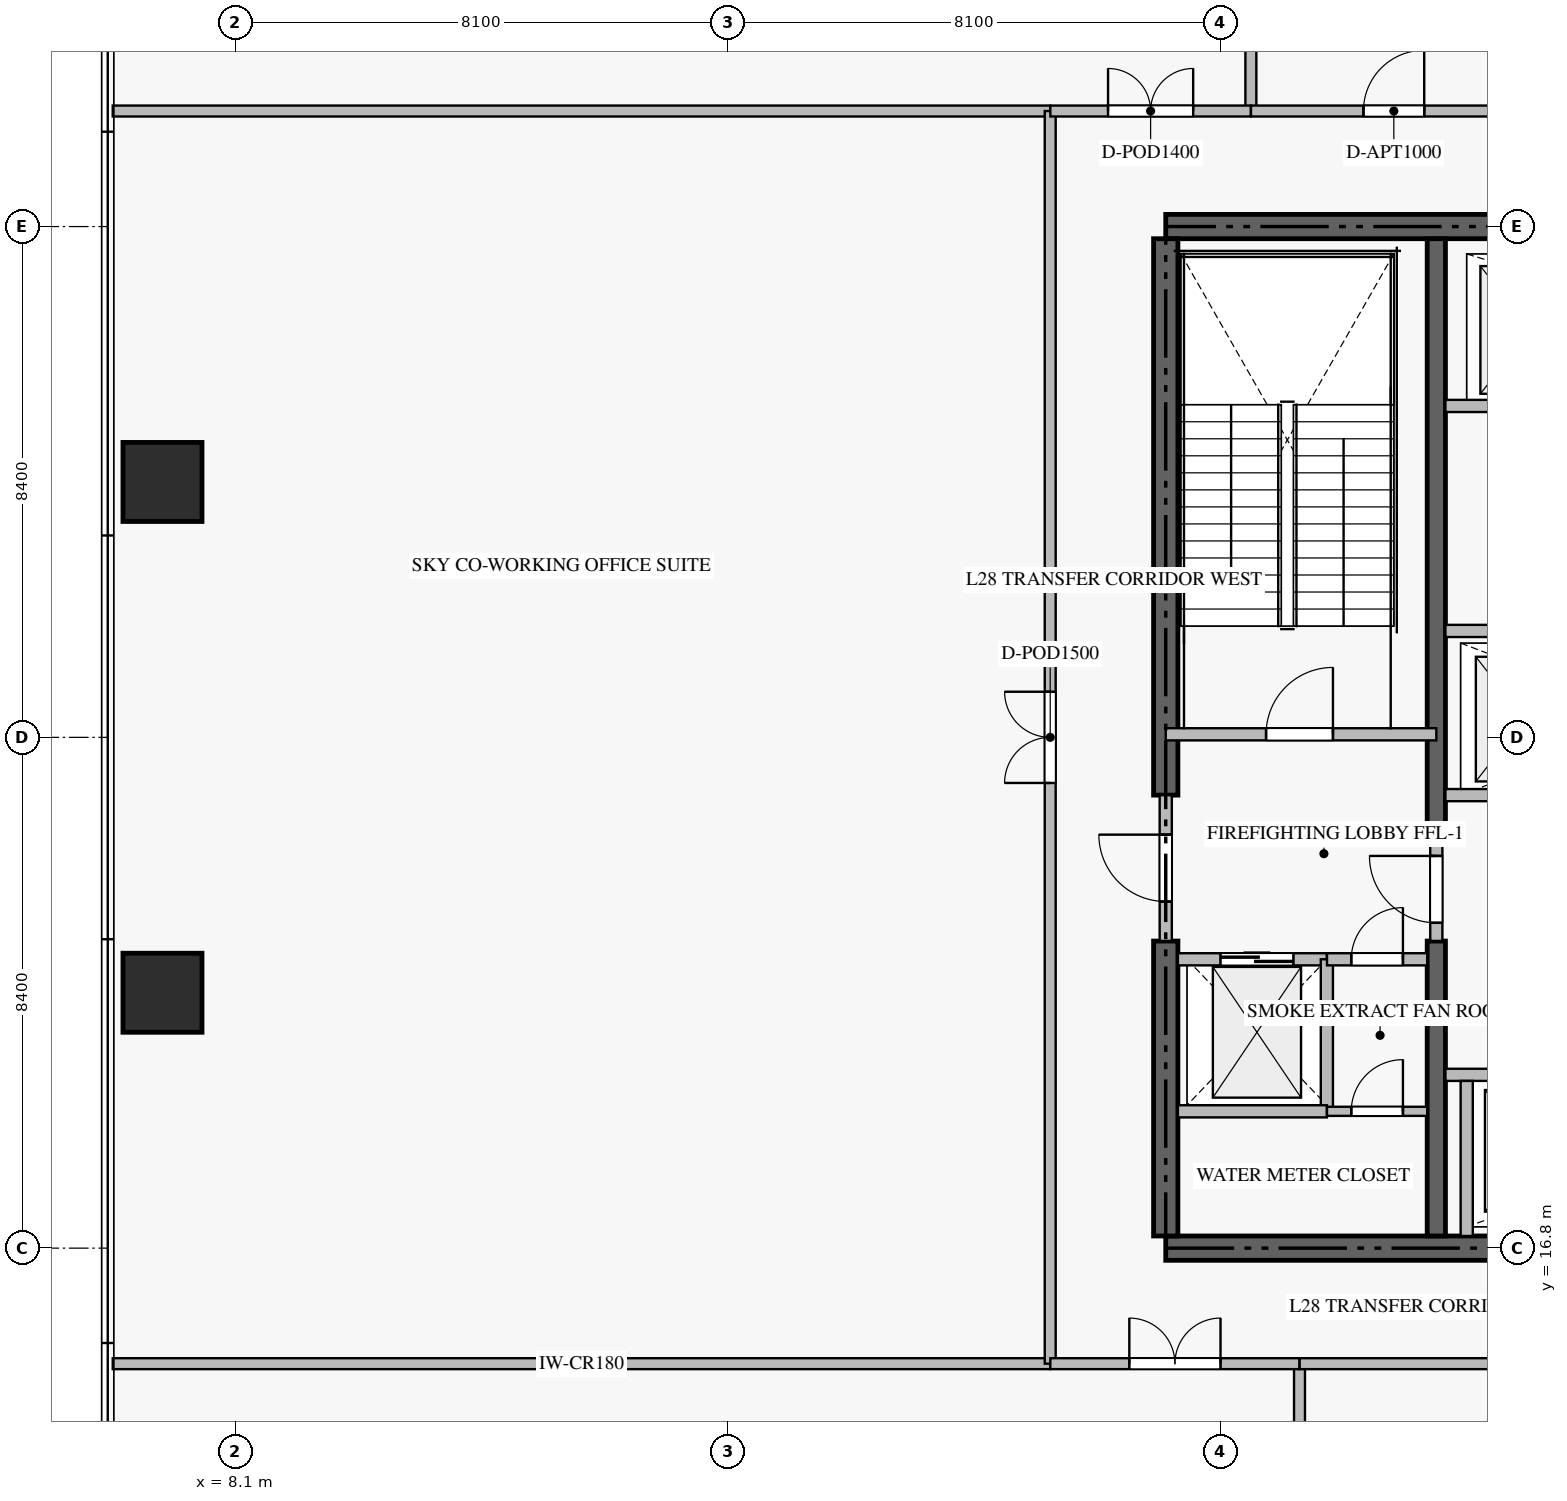
"""IFC4 building model, lengths in metres.
Left out: names, types, materials, properties, quantities, classifications, styles, units other than length and angle.
Written with IfcOpenShell. Run it as: python <this file> out.ifc"""

import sys

from ifc_helpers import new_model, si_unit, direction, frame, frame_2d, origin, origin_2d, place, context, subcontext, project, spatial, rectangle, extrude, source, transform, mapped, element, fill, save


model = new_model("IFC4")
c1 = context("Model", 3, precision=1e-05, world=origin(), true_north=direction((0.0, 1.0)))
c2 = subcontext(c1, "Body", "Model", "MODEL_VIEW")
j1 = project(units=[si_unit("LENGTHUNIT", "METRE"), si_unit("PLANEANGLEUNIT", "RADIAN")], contexts=[c1])
p1 = place(None, origin())
s1 = spatial("IfcSite", under=j1, at=p1, CompositionType="ELEMENT")
p2 = place(p1, origin())
s2 = spatial("IfcBuilding", under=s1, at=p2, CompositionType="ELEMENT")
p3 = place(p2, frame((0.0, 0.0, 115.2)))
s3 = spatial("IfcBuildingStorey", under=s2, at=p3, CompositionType="ELEMENT", Elevation=115.2)
for number, where, z_axis, x_axis in (
    (1, (23.4, 16.8, -0.36), (0.0, 0.0, 1.0), (1.0, 0.0, 0.0)),
    (2, (41.4, 33.6, -0.36), (0.0, 0.0, 1.0), (-1.0, 0.0, 0.0)),
):
    element("IfcWall", number, at=place(p3, frame(where, z_axis=z_axis, x_axis=x_axis)), inside=s3, PredefinedType="SHEAR", context=c2, shape_type="SweptSolid", body=[
        extrude(rectangle(XDim=18.0, YDim=0.4, at=frame_2d((9.0, 0.0))), origin(), (0.0, 0.0, 1.0), 4.868),
    ])
p4 = place(p3, frame((23.4, 17.0, -0.36), z_axis=(0.0, 0.0, 1.0), x_axis=(0.0, 1.0, 0.0)))
e3 = element("IfcWall", 3, at=p4, inside=s3, PredefinedType="SHEAR", context=c2, shape_type="SweptSolid", body=[
    extrude(rectangle(XDim=4.85, YDim=0.4, at=frame_2d((2.425, 0.0))), origin(), (0.0, 0.0, 1.0), 4.868),
])
p5 = place(p3, frame((23.4, 24.25, -0.36), z_axis=(0.0, 0.0, 1.0), x_axis=(0.0, 1.0, 0.0)))
e4 = element("IfcWall", 4, at=p5, inside=s3, PredefinedType="SHEAR", context=c2, shape_type="SweptSolid", body=[
    extrude(rectangle(XDim=9.15, YDim=0.4, at=frame_2d((4.575, 0.0))), origin(), (0.0, 0.0, 1.0), 4.868),
])
p6 = place(p3, frame((27.85, 17.0, -0.36), z_axis=(0.0, 0.0, 1.0), x_axis=(0.0, 1.0, 0.0)))
e5 = element("IfcWall", 5, at=p6, inside=s3, PredefinedType="SHEAR", context=c2, shape_type="SweptSolid", body=[
    extrude(rectangle(XDim=4.85, YDim=0.3, at=frame_2d((2.425, 0.0))), origin(), (0.0, 0.0, 1.0), 4.868),
])
p7 = place(p3, frame((27.85, 23.55, -0.36), z_axis=(0.0, 0.0, 1.0), x_axis=(0.0, 1.0, 0.0)))
e6 = element("IfcWall", 6, at=p7, inside=s3, PredefinedType="SHEAR", context=c2, shape_type="SweptSolid", body=[
    extrude(rectangle(XDim=9.85, YDim=0.3, at=frame_2d((4.925, 0.0))), origin(), (0.0, 0.0, 1.0), 4.868),
])
m1 = source(origin(), c2, "Body", "SweptSolid", [
    extrude(rectangle(XDim=1.3, YDim=1.3, at=origin_2d()), origin(), (0.0, 0.0, 1.0), 4.87),
])
for number, where, z_axis, x_axis in (
    (7, (6.9, 21.0, -0.36), (0.0, 0.0, 1.0), (1.0, 0.0, 0.0)),
    (8, (6.9, 29.4, -0.36), (0.0, 0.0, 1.0), (1.0, 0.0, 0.0)),
):
    element("IfcColumn", number, at=place(p3, frame(where, z_axis=z_axis, x_axis=x_axis)), inside=s3, PredefinedType="COLUMN", context=c2, shape_type="MappedRepresentation", body=[
        mapped(m1, transform((0.0, 0.0, 0.0), scale=1.0)),
    ])
p8 = place(p3, frame((23.4, 25.25, 0.0), z_axis=(0.0, 0.0, 1.0), x_axis=(1.0, 0.0, 0.0)))
e9 = element("IfcWall", 9, at=p8, inside=s3, PredefinedType="STANDARD", context=c2, shape_type="SweptSolid", body=[
    extrude(rectangle(XDim=4.45, YDim=0.2, at=frame_2d((2.225, 0.0))), origin(), (0.0, 0.0, 1.0), 4.51),
])
p9 = place(p8, frame((1.65, 0.0, 0.0)))
e10 = element("IfcOpeningElement", 10, at=p9, cuts=e9, PredefinedType="OPENING", context=c2, shape_type="SweptSolid", body=[
    extrude(rectangle(XDim=1.1, YDim=2.15, at=frame_2d((0.55, 1.075))), frame((0.0, 0.11, 0.0), z_axis=(0.0, -1.0, 0.0), x_axis=(1.0, 0.0, 0.0)), (0.0, 0.0, 1.0), 0.22),
])
p10 = place(p3, frame((23.6, 21.55, 0.0), z_axis=(0.0, 0.0, 1.0), x_axis=(1.0, 0.0, 0.0)))
e11 = element("IfcWall", 11, at=p10, inside=s3, PredefinedType="STANDARD", context=c2, shape_type="SweptSolid", body=[
    extrude(rectangle(XDim=2.45, YDim=0.2, at=frame_2d((1.225, 0.0))), origin(), (0.0, 0.0, 1.0), 4.51),
])
p11 = place(p10, frame((0.7, 0.0, 0.0)))
e12 = element("IfcOpeningElement", 12, at=p11, cuts=e11, PredefinedType="OPENING", context=c2, shape_type="SweptSolid", body=[
    extrude(rectangle(XDim=1.2, YDim=2.2, at=frame_2d((0.6, 1.1))), frame((0.0, 0.11, 0.0), z_axis=(0.0, -1.0, 0.0), x_axis=(1.0, 0.0, 0.0)), (0.0, 0.0, 1.0), 0.22),
])
p12 = place(p3, frame((28.0, 19.65, 0.0), z_axis=(0.0, 0.0, 1.0), x_axis=(1.0, 0.0, 0.0)))
e13 = element("IfcWall", 13, at=p12, inside=s3, PredefinedType="STANDARD", context=c2, shape_type="SweptSolid", body=[
    extrude(rectangle(XDim=2.65, YDim=0.2, at=frame_2d((1.325, 0.0))), origin(), (0.0, 0.0, 1.0), 4.51),
])
p13 = place(p12, frame((0.9, 0.0, 0.0)))
e14 = element("IfcOpeningElement", 14, at=p13, cuts=e13, PredefinedType="OPENING", context=c2, shape_type="SweptSolid", body=[
    extrude(rectangle(XDim=1.1, YDim=2.2, at=frame_2d((0.55, 1.1))), frame((0.0, 0.11, 0.0), z_axis=(0.0, -1.0, 0.0), x_axis=(1.0, 0.0, 0.0)), (0.0, 0.0, 1.0), 0.22),
])
p14 = place(p3, frame((28.35, 17.0, 0.0), z_axis=(0.0, 0.0, 1.0), x_axis=(0.0, 1.0, 0.0)))
e15 = element("IfcWall", 15, at=p14, inside=s3, PredefinedType="STANDARD", context=c2, shape_type="SweptSolid", body=[
    extrude(rectangle(XDim=2.55, YDim=0.2, at=frame_2d((1.275, 0.0))), origin(), (0.0, 0.0, 1.0), 4.51),
])
p15 = place(p3, frame((28.0, 24.25, 0.0), z_axis=(0.0, 0.0, 1.0), x_axis=(1.0, 0.0, 0.0)))
e16 = element("IfcWall", 16, at=p15, inside=s3, PredefinedType="STANDARD", context=c2, shape_type="SweptSolid", body=[
    extrude(rectangle(XDim=2.425, YDim=0.2, at=frame_2d((1.212, 0.0))), origin(), (0.0, 0.0, 1.0), 4.51),
])
p16 = place(p15, frame((0.75, 0.0, 0.0)))
e17 = element("IfcOpeningElement", 17, at=p16, cuts=e16, PredefinedType="OPENING", context=c2, shape_type="SweptSolid", body=[
    extrude(rectangle(XDim=1.1, YDim=2.2, at=frame_2d((0.55, 1.1))), frame((0.0, 0.11, 0.0), z_axis=(0.0, -1.0, 0.0), x_axis=(1.0, 0.0, 0.0)), (0.0, 0.0, 1.0), 0.22),
])
p17 = place(p3, frame((28.0, 30.65, 0.0), z_axis=(0.0, 0.0, 1.0), x_axis=(1.0, 0.0, 0.0)))
e18 = element("IfcWall", 18, at=p17, inside=s3, PredefinedType="STANDARD", context=c2, shape_type="SweptSolid", body=[
    extrude(rectangle(XDim=2.55, YDim=0.2, at=frame_2d((1.275, 0.0))), origin(), (0.0, 0.0, 1.0), 4.51),
])
p18 = place(p17, frame((0.85, 0.0, 0.0)))
e19 = element("IfcOpeningElement", 19, at=p18, cuts=e18, PredefinedType="OPENING", context=c2, shape_type="SweptSolid", body=[
    extrude(rectangle(XDim=1.1, YDim=2.2, at=frame_2d((0.55, 1.1))), frame((0.0, 0.11, 0.0), z_axis=(0.0, -1.0, 0.0), x_axis=(1.0, 0.0, 0.0)), (0.0, 0.0, 1.0), 0.22),
])
p19 = place(p3, frame((26.05, 19.05, 0.0), z_axis=(0.0, 0.0, 1.0), x_axis=(0.0, 1.0, 0.0)))
e20 = element("IfcWall", 20, at=p19, inside=s3, PredefinedType="STANDARD", context=c2, shape_type="SweptSolid", body=[
    extrude(rectangle(XDim=2.5, YDim=0.2, at=frame_2d((1.25, 0.0))), origin(), (0.0, 0.0, 1.0), 4.51),
])
p20 = place(p3, frame((23.6, 19.05, 0.0), z_axis=(0.0, 0.0, 1.0), x_axis=(1.0, 0.0, 0.0)))
e21 = element("IfcWall", 21, at=p20, inside=s3, PredefinedType="STANDARD", context=c2, shape_type="SweptSolid", body=[
    extrude(rectangle(XDim=2.45, YDim=0.2, at=frame_2d((1.225, 0.0))), origin(), (0.0, 0.0, 1.0), 4.51),
])
p21 = place(p3, frame((26.052, 21.55, 0.0), z_axis=(0.0, 0.0, 1.0), x_axis=(1.0, 0.0, 0.0)))
e22 = element("IfcWall", 22, at=p21, inside=s3, PredefinedType="STANDARD", context=c2, shape_type="SweptSolid", body=[
    extrude(rectangle(XDim=1.648, YDim=0.2, at=frame_2d((0.824, 0.0))), origin(), (0.0, 0.0, 1.0), 4.51),
])
p22 = place(p21, frame((0.399, 0.0, 0.0)))
e23 = element("IfcOpeningElement", 23, at=p22, cuts=e22, PredefinedType="OPENING", context=c2, shape_type="SweptSolid", body=[
    extrude(rectangle(XDim=0.85, YDim=2.1, at=frame_2d((0.425, 1.05))), frame((0.0, 0.11, 0.0), z_axis=(0.0, -1.0, 0.0), x_axis=(1.0, 0.0, 0.0)), (0.0, 0.0, 1.0), 0.22),
])
p23 = place(p3, frame((23.4, 21.852, 0.0), z_axis=(0.0, 0.0, 1.0), x_axis=(0.0, 1.0, 0.0)))
e24 = element("IfcWall", 24, at=p23, inside=s3, PredefinedType="STANDARD", context=c2, shape_type="SweptSolid", body=[
    extrude(rectangle(XDim=2.396, YDim=0.2, at=frame_2d((1.198, 0.0))), origin(), (0.0, 0.0, 1.0), 4.51),
])
p24 = place(p23, frame((0.648, 0.0, 0.0)))
e25 = element("IfcOpeningElement", 25, at=p24, cuts=e24, PredefinedType="OPENING", context=c2, shape_type="SweptSolid", body=[
    extrude(rectangle(XDim=1.1, YDim=2.15, at=frame_2d((0.55, 1.075))), frame((0.0, 0.11, 0.0), z_axis=(0.0, -1.0, 0.0), x_axis=(1.0, 0.0, 0.0)), (0.0, 0.0, 1.0), 0.22),
])
p25 = place(p3, frame((27.85, 21.852, 0.0), z_axis=(0.0, 0.0, 1.0), x_axis=(0.0, 1.0, 0.0)))
e26 = element("IfcWall", 26, at=p25, inside=s3, PredefinedType="STANDARD", context=c2, shape_type="SweptSolid", body=[
    extrude(rectangle(XDim=1.696, YDim=0.2, at=frame_2d((0.848, 0.0))), origin(), (0.0, 0.0, 1.0), 4.51),
])
p26 = place(p25, frame((0.298, 0.0, 0.0)))
e27 = element("IfcOpeningElement", 27, at=p26, cuts=e26, PredefinedType="OPENING", context=c2, shape_type="SweptSolid", body=[
    extrude(rectangle(XDim=1.1, YDim=2.15, at=frame_2d((0.55, 1.075))), frame((0.0, 0.11, 0.0), z_axis=(0.0, -1.0, 0.0), x_axis=(1.0, 0.0, 0.0)), (0.0, 0.0, 1.0), 0.22),
])
p27 = place(p3, frame((28.0, 26.95, 0.0), z_axis=(0.0, 0.0, 1.0), x_axis=(1.0, 0.0, 0.0)))
e28 = element("IfcWall", 28, at=p27, inside=s3, PredefinedType="STANDARD", context=c2, shape_type="SweptSolid", body=[
    extrude(rectangle(XDim=6.95, YDim=0.2, at=frame_2d((3.475, 0.0))), origin(), (0.0, 0.0, 1.0), 4.51),
])
p28 = place(p3, frame((26.052, 19.05, 0.0), z_axis=(0.0, 0.0, 1.0), x_axis=(1.0, 0.0, 0.0)))
e29 = element("IfcWall", 29, at=p28, inside=s3, PredefinedType="PARTITIONING", context=c2, shape_type="SweptSolid", body=[
    extrude(rectangle(XDim=1.648, YDim=0.15, at=frame_2d((0.824, 0.0))), origin(), (0.0, 0.0, 1.0), 4.51),
])
p29 = place(p28, frame((0.399, 0.0, 0.0)))
e30 = element("IfcOpeningElement", 30, at=p29, cuts=e29, PredefinedType="OPENING", context=c2, shape_type="SweptSolid", body=[
    extrude(rectangle(XDim=0.85, YDim=2.1, at=frame_2d((0.425, 1.05))), frame((0.0, 0.085, 0.0), z_axis=(0.0, -1.0, 0.0), x_axis=(1.0, 0.0, 0.0)), (0.0, 0.0, 1.0), 0.17),
])
for number, where, z_axis, x_axis in (
    (31, (6.082, 14.9, 0.0), (0.0, 0.0, 1.0), (1.0, 0.0, 0.0)),
    (32, (6.082, 35.5, 0.0), (0.0, 0.0, 1.0), (1.0, 0.0, 0.0)),
):
    element("IfcWall", number, at=place(p3, frame(where, z_axis=z_axis, x_axis=x_axis)), inside=s3, PredefinedType="PARTITIONING", context=c2, shape_type="SweptSolid", body=[
        extrude(rectangle(XDim=15.418, YDim=0.18, at=frame_2d((7.709, 0.0))), origin(), (0.0, 0.0, 1.0), 4.51),
    ])
p30 = place(p3, frame((21.5, 14.9, 0.0), z_axis=(0.0, 0.0, 1.0), x_axis=(0.0, 1.0, 0.0)))
e33 = element("IfcWall", 33, at=p30, inside=s3, PredefinedType="PARTITIONING", context=c2, shape_type="SweptSolid", body=[
    extrude(rectangle(XDim=20.6, YDim=0.18, at=frame_2d((10.3, 0.0))), origin(), (0.0, 0.0, 1.0), 4.51),
])
p31 = place(p30, frame((9.55, 0.0, 0.0)))
e34 = element("IfcOpeningElement", 34, at=p31, cuts=e33, PredefinedType="OPENING", context=c2, shape_type="SweptSolid", body=[
    extrude(rectangle(XDim=1.5, YDim=2.25, at=frame_2d((0.75, 1.125))), frame((0.0, 0.1, 0.0), z_axis=(0.0, -1.0, 0.0), x_axis=(1.0, 0.0, 0.0)), (0.0, 0.0, 1.0), 0.2),
])
for number, where, z_axis, x_axis in (
    (35, (25.6, 0.282, 0.0), (0.0, 0.0, 1.0), (0.0, 1.0, 0.0)),
    (36, (24.8, 35.5, 0.0), (0.0, 0.0, 1.0), (0.0, 1.0, 0.0)),
):
    element("IfcWall", number, at=place(p3, frame(where, z_axis=z_axis, x_axis=x_axis)), inside=s3, PredefinedType="PARTITIONING", context=c2, shape_type="SweptSolid", body=[
        extrude(rectangle(XDim=14.618, YDim=0.18, at=frame_2d((7.309, 0.0))), origin(), (0.0, 0.0, 1.0), 4.51),
    ])
p32 = place(p3, frame((21.502, 14.9, 0.0), z_axis=(0.0, 0.0, 1.0), x_axis=(1.0, 0.0, 0.0)))
e37 = element("IfcWall", 37, at=p32, inside=s3, PredefinedType="PARTITIONING", context=c2, shape_type="SweptSolid", body=[
    extrude(rectangle(XDim=4.098, YDim=0.18, at=frame_2d((2.049, 0.0))), origin(), (0.0, 0.0, 1.0), 4.51),
])
p33 = place(p32, frame((1.299, 0.0, 0.0)))
e38 = element("IfcOpeningElement", 38, at=p33, cuts=e37, PredefinedType="OPENING", context=c2, shape_type="SweptSolid", body=[
    extrude(rectangle(XDim=1.5, YDim=2.25, at=frame_2d((0.75, 1.125))), frame((0.0, 0.1, 0.0), z_axis=(0.0, -1.0, 0.0), x_axis=(1.0, 0.0, 0.0)), (0.0, 0.0, 1.0), 0.2),
])
p34 = place(p3, frame((25.602, 14.9, 0.0), z_axis=(0.0, 0.0, 1.0), x_axis=(1.0, 0.0, 0.0)))
e39 = element("IfcWall", 39, at=p34, inside=s3, PredefinedType="PARTITIONING", context=c2, shape_type="SweptSolid", body=[
    extrude(rectangle(XDim=13.798, YDim=0.18, at=frame_2d((6.899, 0.0))), origin(), (0.0, 0.0, 1.0), 4.51),
])
p35 = place(p34, frame((6.099, 0.0, 0.0)))
e40 = element("IfcOpeningElement", 40, at=p35, cuts=e39, PredefinedType="OPENING", context=c2, shape_type="SweptSolid", body=[
    extrude(rectangle(XDim=1.6, YDim=2.3, at=frame_2d((0.8, 1.15))), frame((0.0, 0.1, 0.0), z_axis=(0.0, -1.0, 0.0), x_axis=(1.0, 0.0, 0.0)), (0.0, 0.0, 1.0), 0.2),
])
p36 = place(p3, frame((21.502, 35.5, 0.0), z_axis=(0.0, 0.0, 1.0), x_axis=(1.0, 0.0, 0.0)))
e41 = element("IfcWall", 41, at=p36, inside=s3, PredefinedType="PARTITIONING", context=c2, shape_type="SweptSolid", body=[
    extrude(rectangle(XDim=3.298, YDim=0.18, at=frame_2d((1.649, 0.0))), origin(), (0.0, 0.0, 1.0), 4.51),
])
p37 = place(p36, frame((0.949, 0.0, 0.0)))
e42 = element("IfcOpeningElement", 42, at=p37, cuts=e41, PredefinedType="OPENING", context=c2, shape_type="SweptSolid", body=[
    extrude(rectangle(XDim=1.4, YDim=2.25, at=frame_2d((0.7, 1.125))), frame((0.0, 0.1, 0.0), z_axis=(0.0, -1.0, 0.0), x_axis=(1.0, 0.0, 0.0)), (0.0, 0.0, 1.0), 0.2),
])
p38 = place(p3, frame((24.802, 35.5, 0.0), z_axis=(0.0, 0.0, 1.0), x_axis=(1.0, 0.0, 0.0)))
e43 = element("IfcWall", 43, at=p38, inside=s3, PredefinedType="PARTITIONING", context=c2, shape_type="SweptSolid", body=[
    extrude(rectangle(XDim=4.698, YDim=0.18, at=frame_2d((2.349, 0.0))), origin(), (0.0, 0.0, 1.0), 4.51),
])
p39 = place(p38, frame((1.849, 0.0, 0.0)))
e44 = element("IfcOpeningElement", 44, at=p39, cuts=e43, PredefinedType="OPENING", context=c2, shape_type="SweptSolid", body=[
    extrude(rectangle(XDim=1.0, YDim=2.15, at=frame_2d((0.5, 1.075))), frame((0.0, 0.1, 0.0), z_axis=(0.0, -1.0, 0.0), x_axis=(1.0, 0.0, 0.0)), (0.0, 0.0, 1.0), 0.2),
])
m2 = source(origin(), c2, "Body", "SweptSolid", [
    extrude(rectangle(XDim=1.1, YDim=2.15, at=frame_2d((0.55, 1.075))), frame((0.0, 0.025, 0.0), z_axis=(0.0, -1.0, 0.0), x_axis=(1.0, 0.0, 0.0)), (0.0, 0.0, 1.0), 0.05),
])
p40 = place(p9, origin())
e45 = element("IfcDoor", 45, at=p40, inside=s3, OperationType="SINGLE_SWING_RIGHT", PredefinedType="DOOR", context=c2, shape_type="MappedRepresentation", body=[
    mapped(m2, transform((0.0, 0.0, 0.0), scale=1.0)),
])
fill(e10, e45)
m3 = source(origin(), c2, "Body", "SweptSolid", [
    extrude(rectangle(XDim=1.2, YDim=2.2, at=frame_2d((0.6, 1.1))), frame((0.0, 0.025, 0.0), z_axis=(0.0, -1.0, 0.0), x_axis=(1.0, 0.0, 0.0)), (0.0, 0.0, 1.0), 0.05),
])
p41 = place(p11, origin())
e46 = element("IfcDoor", 46, at=p41, inside=s3, OperationType="DOUBLE_DOOR_SLIDING", PredefinedType="DOOR", context=c2, shape_type="MappedRepresentation", body=[
    mapped(m3, transform((0.0, 0.0, 0.0), scale=1.0)),
])
fill(e12, e46)
m4 = source(origin(), c2, "Body", "SweptSolid", [
    extrude(rectangle(XDim=0.85, YDim=2.1, at=frame_2d((0.425, 1.05))), frame((0.0, 0.025, 0.0), z_axis=(0.0, -1.0, 0.0), x_axis=(1.0, 0.0, 0.0)), (0.0, 0.0, 1.0), 0.05),
])
p42 = place(p22, origin())
e47 = element("IfcDoor", 47, at=p42, inside=s3, OperationType="SINGLE_SWING_RIGHT", PredefinedType="DOOR", context=c2, shape_type="MappedRepresentation", body=[
    mapped(m4, transform((0.0, 0.0, 0.0), scale=1.0)),
])
fill(e23, e47)
p43 = place(p24, origin())
e48 = element("IfcDoor", 48, at=p43, inside=s3, OperationType="SINGLE_SWING_RIGHT", PredefinedType="DOOR", context=c2, shape_type="MappedRepresentation", body=[
    mapped(m2, transform((0.0, 0.0, 0.0), scale=1.0)),
])
fill(e25, e48)
p44 = place(p26, origin())
e49 = element("IfcDoor", 49, at=p44, inside=s3, OperationType="SINGLE_SWING_RIGHT", PredefinedType="DOOR", context=c2, shape_type="MappedRepresentation", body=[
    mapped(m2, transform((0.0, 0.0, 0.0), scale=1.0)),
])
fill(e27, e49)
p45 = place(p29, origin())
e50 = element("IfcDoor", 50, at=p45, inside=s3, OperationType="SINGLE_SWING_RIGHT", PredefinedType="DOOR", context=c2, shape_type="MappedRepresentation", body=[
    mapped(m4, transform((0.0, 0.0, 0.0), scale=1.0)),
])
fill(e30, e50)
m5 = source(origin(), c2, "Body", "SweptSolid", [
    extrude(rectangle(XDim=1.5, YDim=2.25, at=frame_2d((0.75, 1.125))), frame((0.0, 0.025, 0.0), z_axis=(0.0, -1.0, 0.0), x_axis=(1.0, 0.0, 0.0)), (0.0, 0.0, 1.0), 0.05),
])
p46 = place(p31, origin())
e51 = element("IfcDoor", 51, at=p46, inside=s3, OperationType="DOUBLE_DOOR_SINGLE_SWING", PredefinedType="DOOR", context=c2, shape_type="MappedRepresentation", body=[
    mapped(m5, transform((0.0, 0.0, 0.0), scale=1.0)),
])
fill(e34, e51)
p47 = place(p33, origin())
e52 = element("IfcDoor", 52, at=p47, inside=s3, OperationType="DOUBLE_DOOR_SINGLE_SWING", PredefinedType="DOOR", context=c2, shape_type="MappedRepresentation", body=[
    mapped(m5, transform((0.0, 0.0, 0.0), scale=1.0)),
])
fill(e38, e52)
m6 = source(origin(), c2, "Body", "SweptSolid", [
    extrude(rectangle(XDim=1.4, YDim=2.25, at=frame_2d((0.7, 1.125))), frame((0.0, 0.025, 0.0), z_axis=(0.0, -1.0, 0.0), x_axis=(1.0, 0.0, 0.0)), (0.0, 0.0, 1.0), 0.05),
])
p48 = place(p37, origin())
e53 = element("IfcDoor", 53, at=p48, inside=s3, OperationType="DOUBLE_DOOR_SINGLE_SWING", PredefinedType="DOOR", context=c2, shape_type="MappedRepresentation", body=[
    mapped(m6, transform((0.0, 0.0, 0.0), scale=1.0)),
])
fill(e42, e53)
m7 = source(origin(), c2, "Body", "SweptSolid", [
    extrude(rectangle(XDim=1.0, YDim=2.15, at=frame_2d((0.5, 1.075))), frame((0.0, 0.025, 0.0), z_axis=(0.0, -1.0, 0.0), x_axis=(1.0, 0.0, 0.0)), (0.0, 0.0, 1.0), 0.05),
])
p49 = place(p39, origin())
e54 = element("IfcDoor", 54, at=p49, inside=s3, OperationType="SINGLE_SWING_RIGHT", PredefinedType="DOOR", context=c2, shape_type="MappedRepresentation", body=[
    mapped(m7, transform((0.0, 0.0, 0.0), scale=1.0)),
])
fill(e44, e54)
save(model, sys.argv[1])
